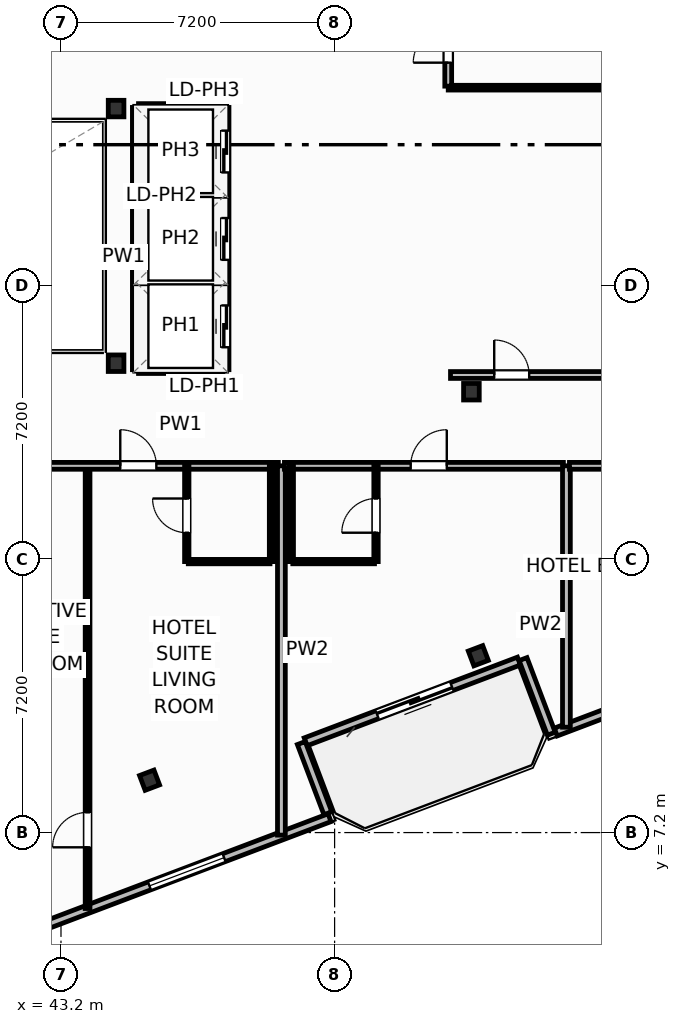
"""IFC4 building model, lengths in metres.
Left out: names, types, materials, properties, quantities, classifications, styles, units other than length and angle.
Written with IfcOpenShell. Run it as: python <this file> out.ifc"""

import sys

from ifc_helpers import new_model, si_unit, direction, frame, frame_2d, origin, origin_2d, place, context, subcontext, project, spatial, rectangle, i_section, extrude, element, fill, save


model = new_model("IFC4")
c1 = context("Model", 3, precision=1e-05, world=origin(), true_north=direction((0.0, 1.0)))
c2 = subcontext(c1, "Body", "Model", "MODEL_VIEW")
j1 = project(units=[si_unit("LENGTHUNIT", "METRE"), si_unit("PLANEANGLEUNIT", "RADIAN")], contexts=[c1])
p1 = place(None, origin())
s1 = spatial("IfcSite", under=j1, at=p1, CompositionType="ELEMENT")
p2 = place(p1, origin())
s2 = spatial("IfcBuilding", under=s1, at=p2, CompositionType="ELEMENT")
p3 = place(p2, frame((0.0, 0.0, 242.3)))
s3 = spatial("IfcBuildingStorey", under=s2, at=p3, CompositionType="ELEMENT", Elevation=242.3)
for number, where, z_axis, x_axis in (
    (1, (44.65, 19.55, 0.0), (0.0, 0.0, 1.0), (1.0, 0.0, 0.0)),
    (2, (44.65, 26.25, 0.0), (0.0, 0.0, 1.0), (1.0, 0.0, 0.0)),
    (3, (54.0, 18.8, 0.0), (0.0, 0.0, 1.0), (1.0, 0.0, 0.0)),
):
    element("IfcColumn", number, at=place(p3, frame(where, z_axis=z_axis, x_axis=x_axis)), inside=s3, PredefinedType="COLUMN", context=c2, shape_type="SweptSolid", body=[
        extrude(i_section(OverallWidth=0.412, OverallDepth=0.435, WebThickness=0.036, FlangeThickness=0.057, FilletRadius=0.025, at=origin_2d()), origin(), (0.0, 0.0, 1.0), 3.7),
    ])
for number, where, z_axis, x_axis in (
    (4, (45.531, 8.578, 0.0), (0.0, 0.0, 1.0), (0.935, 0.354, 0.0)),
    (5, (54.181, 11.853, 0.0), (0.0, 0.0, 1.0), (0.935, 0.354, 0.0)),
):
    element("IfcColumn", number, at=place(p3, frame(where, z_axis=z_axis, x_axis=x_axis)), inside=s3, PredefinedType="COLUMN", context=c2, shape_type="SweptSolid", body=[
        extrude(i_section(OverallWidth=0.406, OverallDepth=0.416, WebThickness=0.03, FlangeThickness=0.048, FilletRadius=0.025, at=origin_2d()), origin(), (0.0, 0.0, 1.0), 3.7),
    ])
p4 = place(p3, frame((55.25, 11.713, 0.0), z_axis=(0.0, 0.0, 1.0), x_axis=(-0.935227640088, -0.354046976001, 0.0)))
e6 = element("IfcWall", 6, at=p4, inside=s3, PredefinedType="SOLIDWALL", context=c2, shape_type="SweptSolid", body=[
    extrude(rectangle(XDim=6.0, YDim=0.22, at=frame_2d((3.0, 0.0))), origin(), (0.0, 0.0, 1.0), 2.73),
])
p5 = place(p4, frame((1.888, 0.0, 0.0)))
e7 = element("IfcOpeningElement", 7, at=p5, cuts=e6, PredefinedType="OPENING", context=c2, shape_type="SweptSolid", body=[
    extrude(rectangle(XDim=2.1, YDim=2.3, at=frame_2d((1.05, 1.15))), frame((0.0, 0.12, 0.0), z_axis=(0.0, -1.0, 0.0), x_axis=(1.0, 0.0, 0.0)), (0.0, 0.0, 1.0), 0.24),
])
p6 = place(p3, frame((42.752, 4.746, 0.0), z_axis=(0.0, 0.0, 1.0), x_axis=(0.935216926991, 0.354075273733, 0.0)))
e8 = element("IfcWall", 8, at=p6, inside=s3, PredefinedType="SOLIDWALL", context=c2, shape_type="SweptSolid", body=[
    extrude(rectangle(XDim=8.035, YDim=0.22, at=frame_2d((4.018, 0.0))), origin(), (0.0, 0.0, 1.0), 2.73),
])
p7 = place(p6, frame((2.968, 0.0, 0.8)))
e9 = element("IfcOpeningElement", 9, at=p7, cuts=e8, PredefinedType="OPENING", context=c2, shape_type="SweptSolid", body=[
    extrude(rectangle(XDim=2.1, YDim=1.75, at=frame_2d((1.05, 0.875))), frame((0.0, 0.12, 0.0), z_axis=(0.0, -1.0, 0.0), x_axis=(1.0, 0.0, 0.0)), (0.0, 0.0, 1.0), 0.24),
])
p8 = place(p3, frame((50.223, 7.708, 0.0), z_axis=(0.0, 0.0, 1.0), x_axis=(-0.354020680661, 0.935237594232, 0.0)))
e10 = element("IfcWall", 10, at=p8, inside=s3, PredefinedType="SOLIDWALL", context=c2, shape_type="SweptSolid", body=[
    extrude(rectangle(XDim=1.975, YDim=0.22, at=frame_2d((0.988, 0.0))), origin(), (0.0, 0.0, 1.0), 2.73),
])
p9 = place(p3, frame((55.359, 11.764, 0.0), z_axis=(0.0, 0.0, 1.0), x_axis=(0.354026782794, -0.935235284334, 0.0)))
e11 = element("IfcWall", 11, at=p9, inside=s3, PredefinedType="SOLIDWALL", context=c2, shape_type="SweptSolid", body=[
    extrude(rectangle(XDim=2.1, YDim=0.22, at=frame_2d((1.05, 0.0))), origin(), (0.0, 0.0, 1.0), 2.73),
])
p10 = place(p3, frame((56.219, 9.845, 0.0), z_axis=(0.0, 0.0, 1.0), x_axis=(0.935225601791, 0.354052360188, 0.0)))
e12 = element("IfcWall", 12, at=p10, inside=s3, PredefinedType="SOLIDWALL", context=c2, shape_type="SweptSolid", body=[
    extrude(rectangle(XDim=17.647, YDim=0.22, at=frame_2d((8.824, 0.0))), origin(), (0.0, 0.0, 1.0), 2.73),
])
p11 = place(p10, frame((7.774, 0.0, 0.8)))
e13 = element("IfcOpeningElement", 13, at=p11, cuts=e12, PredefinedType="OPENING", context=c2, shape_type="SweptSolid", body=[
    extrude(rectangle(XDim=2.1, YDim=1.75, at=frame_2d((1.05, 0.875))), frame((0.0, 0.12, 0.0), z_axis=(0.0, -1.0, 0.0), x_axis=(1.0, 0.0, 0.0)), (0.0, 0.0, 1.0), 0.24),
])
p12 = place(p3, frame((43.9, 5.202, 0.0), z_axis=(0.0, 0.0, 1.0), x_axis=(0.0, 1.0, 0.0)))
e14 = element("IfcWall", 14, at=p12, inside=s3, PredefinedType="PARTITIONING", context=c2, shape_type="SweptSolid", body=[
    extrude(rectangle(XDim=11.648, YDim=0.125, at=frame_2d((5.824, 0.0))), origin(), (0.0, 0.0, 1.0), 3.45),
])
p13 = place(p12, frame((1.61, 0.0, 0.0)))
e15 = element("IfcOpeningElement", 15, at=p13, cuts=e14, PredefinedType="OPENING", context=c2, shape_type="SweptSolid", body=[
    extrude(rectangle(XDim=0.92, YDim=2.05, at=frame_2d((0.46, 1.025))), frame((0.0, 0.073, 0.0), z_axis=(0.0, -1.0, 0.0), x_axis=(1.0, 0.0, 0.0)), (0.0, 0.0, 1.0), 0.145),
])
p14 = place(p3, frame((41.08, 16.85, 0.0), z_axis=(0.0, 0.0, 1.0), x_axis=(1.0, 0.0, 0.0)))
e16 = element("IfcWall", 16, at=p14, inside=s3, PredefinedType="PARTITIONING", context=c2, shape_type="SweptSolid", body=[
    extrude(rectangle(XDim=7.84, YDim=0.18, at=frame_2d((3.92, 0.0))), origin(), (0.0, 0.0, 1.0), 3.45),
])
p15 = place(p14, frame((3.68, 0.0, 0.0)))
e17 = element("IfcOpeningElement", 17, at=p15, cuts=e16, PredefinedType="OPENING", context=c2, shape_type="SweptSolid", body=[
    extrude(rectangle(XDim=0.95, YDim=2.15, at=frame_2d((0.475, 1.075))), frame((0.0, 0.1, 0.0), z_axis=(0.0, -1.0, 0.0), x_axis=(1.0, 0.0, 0.0)), (0.0, 0.0, 1.0), 0.2),
])
p16 = place(p3, frame((46.55, 14.33, 0.0), z_axis=(0.0, 0.0, 1.0), x_axis=(1.0, 0.0, 0.0)))
e18 = element("IfcWall", 18, at=p16, inside=s3, PredefinedType="PARTITIONING", context=c2, shape_type="SweptSolid", body=[
    extrude(rectangle(XDim=2.15, YDim=0.115, at=frame_2d((1.075, 0.0))), origin(), (0.0, 0.0, 1.0), 3.45),
])
p17 = place(p3, frame((46.51, 14.33, 0.0), z_axis=(0.0, 0.0, 1.0), x_axis=(0.0, 1.0, 0.0)))
e19 = element("IfcWall", 19, at=p17, inside=s3, PredefinedType="PARTITIONING", context=c2, shape_type="SweptSolid", body=[
    extrude(rectangle(XDim=2.52, YDim=0.115, at=frame_2d((1.26, 0.0))), origin(), (0.0, 0.0, 1.0), 3.45),
])
p18 = place(p17, frame((0.76, 0.0, 0.0)))
e20 = element("IfcOpeningElement", 20, at=p18, cuts=e19, PredefinedType="OPENING", context=c2, shape_type="SweptSolid", body=[
    extrude(rectangle(XDim=0.9, YDim=2.05, at=frame_2d((0.45, 1.025))), frame((0.0, 0.067, 0.0), z_axis=(0.0, -1.0, 0.0), x_axis=(1.0, 0.0, 0.0)), (0.0, 0.0, 1.0), 0.135),
])
p19 = place(p3, frame((48.74, 14.33, 0.0), z_axis=(0.0, 0.0, 1.0), x_axis=(0.0, 1.0, 0.0)))
e21 = element("IfcWall", 21, at=p19, inside=s3, PredefinedType="PARTITIONING", context=c2, shape_type="SweptSolid", body=[
    extrude(rectangle(XDim=2.52, YDim=0.115, at=frame_2d((1.26, 0.0))), origin(), (0.0, 0.0, 1.0), 3.45),
])
p20 = place(p3, frame((49.0, 7.133, 0.0), z_axis=(0.0, 0.0, 1.0), x_axis=(0.0, 1.0, 0.0)))
e22 = element("IfcWall", 22, at=p20, inside=s3, PredefinedType="PARTITIONING", context=c2, shape_type="SweptSolid", body=[
    extrude(rectangle(XDim=9.717, YDim=0.205, at=frame_2d((4.858, 0.0))), origin(), (0.0, 0.0, 1.0), 3.45),
])
p21 = place(p3, frame((49.08, 16.85, 0.0), z_axis=(0.0, 0.0, 1.0), x_axis=(1.0, 0.0, 0.0)))
e23 = element("IfcWall", 23, at=p21, inside=s3, PredefinedType="PARTITIONING", context=c2, shape_type="SweptSolid", body=[
    extrude(rectangle(XDim=7.34, YDim=0.18, at=frame_2d((3.67, 0.0))), origin(), (0.0, 0.0, 1.0), 3.45),
])
p22 = place(p21, frame((3.322, 0.0, 0.0)))
e24 = element("IfcOpeningElement", 24, at=p22, cuts=e23, PredefinedType="OPENING", context=c2, shape_type="SweptSolid", body=[
    extrude(rectangle(XDim=0.95, YDim=2.15, at=frame_2d((0.475, 1.075))), frame((0.0, 0.1, 0.0), z_axis=(0.0, -1.0, 0.0), x_axis=(1.0, 0.0, 0.0)), (0.0, 0.0, 1.0), 0.2),
])
p23 = place(p3, frame((49.3, 14.33, 0.0), z_axis=(0.0, 0.0, 1.0), x_axis=(1.0, 0.0, 0.0)))
e25 = element("IfcWall", 25, at=p23, inside=s3, PredefinedType="PARTITIONING", context=c2, shape_type="SweptSolid", body=[
    extrude(rectangle(XDim=2.15, YDim=0.115, at=frame_2d((1.075, 0.0))), origin(), (0.0, 0.0, 1.0), 3.45),
])
p24 = place(p3, frame((51.49, 14.33, 0.0), z_axis=(0.0, 0.0, 1.0), x_axis=(0.0, 1.0, 0.0)))
e26 = element("IfcWall", 26, at=p24, inside=s3, PredefinedType="PARTITIONING", context=c2, shape_type="SweptSolid", body=[
    extrude(rectangle(XDim=2.52, YDim=0.115, at=frame_2d((1.26, 0.0))), origin(), (0.0, 0.0, 1.0), 3.45),
])
p25 = place(p24, frame((0.76, 0.0, 0.0)))
e27 = element("IfcOpeningElement", 27, at=p25, cuts=e26, PredefinedType="OPENING", context=c2, shape_type="SweptSolid", body=[
    extrude(rectangle(XDim=0.9, YDim=2.05, at=frame_2d((0.45, 1.025))), frame((0.0, 0.067, 0.0), z_axis=(0.0, -1.0, 0.0), x_axis=(1.0, 0.0, 0.0)), (0.0, 0.0, 1.0), 0.135),
])
p26 = place(p3, frame((49.26, 14.33, 0.0), z_axis=(0.0, 0.0, 1.0), x_axis=(0.0, 1.0, 0.0)))
e28 = element("IfcWall", 28, at=p26, inside=s3, PredefinedType="PARTITIONING", context=c2, shape_type="SweptSolid", body=[
    extrude(rectangle(XDim=2.52, YDim=0.115, at=frame_2d((1.26, 0.0))), origin(), (0.0, 0.0, 1.0), 3.45),
])
p27 = place(p3, frame((56.5, 9.972, 0.0), z_axis=(0.0, 0.0, 1.0), x_axis=(0.0, 1.0, 0.0)))
e29 = element("IfcWall", 29, at=p27, inside=s3, PredefinedType="PARTITIONING", context=c2, shape_type="SweptSolid", body=[
    extrude(rectangle(XDim=6.878, YDim=0.205, at=frame_2d((3.439, 0.0))), origin(), (0.0, 0.0, 1.0), 3.45),
])
p28 = place(p3, frame((56.58, 16.85, 0.0), z_axis=(0.0, 0.0, 1.0), x_axis=(1.0, 0.0, 0.0)))
e30 = element("IfcWall", 30, at=p28, inside=s3, PredefinedType="PARTITIONING", context=c2, shape_type="SweptSolid", body=[
    extrude(rectangle(XDim=17.404, YDim=0.18, at=frame_2d((8.702, 0.0))), origin(), (0.0, 0.0, 1.0), 3.45),
])
p29 = place(p28, frame((0.995, 0.0, 0.0)))
e31 = element("IfcOpeningElement", 31, at=p29, cuts=e30, PredefinedType="OPENING", context=c2, shape_type="SweptSolid", body=[
    extrude(rectangle(XDim=0.95, YDim=2.05, at=frame_2d((0.475, 1.025))), frame((0.0, 0.1, 0.0), z_axis=(0.0, -1.0, 0.0), x_axis=(1.0, 0.0, 0.0)), (0.0, 0.0, 1.0), 0.2),
])
p30 = place(p3, frame((53.45, 19.24, 0.0), z_axis=(0.0, 0.0, 1.0), x_axis=(1.0, 0.0, 0.0)))
e32 = element("IfcWall", 32, at=p30, inside=s3, PredefinedType="PARTITIONING", context=c2, shape_type="SweptSolid", body=[
    extrude(rectangle(XDim=22.156, YDim=0.18, at=frame_2d((11.078, 0.0))), origin(), (0.0, 0.0, 1.0), 3.45),
])
p31 = place(p30, frame((1.15, 0.0, 0.0)))
e33 = element("IfcOpeningElement", 33, at=p31, cuts=e32, PredefinedType="OPENING", context=c2, shape_type="SweptSolid", body=[
    extrude(rectangle(XDim=0.92, YDim=2.05, at=frame_2d((0.46, 1.025))), frame((0.0, 0.1, 0.0), z_axis=(0.0, -1.0, 0.0), x_axis=(1.0, 0.0, 0.0)), (0.0, 0.0, 1.0), 0.2),
])
p32 = place(p3, frame((53.39, 26.8, 0.0), z_axis=(0.0, 0.0, 1.0), x_axis=(1.0, 0.0, 0.0)))
e34 = element("IfcWall", 34, at=p32, inside=s3, PredefinedType="PARTITIONING", context=c2, shape_type="SweptSolid", body=[
    extrude(rectangle(XDim=20.445, YDim=0.125, at=frame_2d((10.223, 0.0))), origin(), (0.0, 0.0, 1.0), 2.739),
])
p33 = place(p3, frame((53.39, 26.84, 0.0), z_axis=(0.0, 0.0, 1.0), x_axis=(0.0, 1.0, 0.0)))
e35 = element("IfcWall", 35, at=p33, inside=s3, PredefinedType="PARTITIONING", context=c2, shape_type="SweptSolid", body=[
    extrude(rectangle(XDim=12.46, YDim=0.18, at=frame_2d((6.23, 0.0))), origin(), (0.0, 0.0, 1.0), 3.45),
])
p34 = place(p33, frame((0.618, 0.0, 0.0)))
e36 = element("IfcOpeningElement", 36, at=p34, cuts=e35, PredefinedType="OPENING", context=c2, shape_type="SweptSolid", body=[
    extrude(rectangle(XDim=0.92, YDim=2.05, at=frame_2d((0.46, 1.025))), frame((0.0, 0.1, 0.0), z_axis=(0.0, -1.0, 0.0), x_axis=(1.0, 0.0, 0.0)), (0.0, 0.0, 1.0), 0.2),
])
for number, where, z_axis, x_axis in (
    (37, (45.24, 21.675, 0.0), (0.0, 0.0, 1.0), (1.0, 0.0, 0.0)),
    (38, (45.24, 23.975, 0.0), (0.0, 0.0, 1.0), (1.0, 0.0, 0.0)),
):
    element("IfcWall", number, at=place(p3, frame(where, z_axis=z_axis, x_axis=x_axis)), inside=s3, PredefinedType="PARTITIONING", context=c2, shape_type="SweptSolid", body=[
        extrude(rectangle(XDim=2.22, YDim=0.2, at=frame_2d((1.11, 0.0))), origin(), (0.0, 0.0, 1.0), 3.45),
    ])
p35 = place(p3, frame((45.24, 19.38, 0.0), z_axis=(0.0, 0.0, 1.0), x_axis=(1.0, 0.0, 0.0)))
e39 = element("IfcWall", 39, at=p35, inside=s3, PredefinedType="PARTITIONING", context=c2, shape_type="SweptSolid", body=[
    extrude(rectangle(XDim=2.22, YDim=0.2, at=frame_2d((1.11, 0.0))), origin(), (0.0, 0.0, 1.0), 2.662),
])
p36 = place(p3, frame((45.24, 26.28, 0.0), z_axis=(0.0, 0.0, 1.0), x_axis=(1.0, 0.0, 0.0)))
e40 = element("IfcWall", 40, at=p36, inside=s3, PredefinedType="PARTITIONING", context=c2, shape_type="SweptSolid", body=[
    extrude(rectangle(XDim=2.22, YDim=0.2, at=frame_2d((1.11, 0.0))), origin(), (0.0, 0.0, 1.0), 3.45),
])
p37 = place(p3, frame((45.18, 19.38, 0.0), z_axis=(0.0, 0.0, 1.0), x_axis=(0.0, 1.0, 0.0)))
e41 = element("IfcWall", 41, at=p37, inside=s3, PredefinedType="PARTITIONING", context=c2, shape_type="SweptSolid", body=[
    extrude(rectangle(XDim=6.9, YDim=0.2, at=frame_2d((3.45, 0.0))), origin(), (0.0, 0.0, 1.0), 3.45),
])
p38 = place(p3, frame((47.52, 19.38, 0.0), z_axis=(0.0, 0.0, 1.0), x_axis=(0.0, 1.0, 0.0)))
e42 = element("IfcWall", 42, at=p38, inside=s3, PredefinedType="PARTITIONING", context=c2, shape_type="SweptSolid", body=[
    extrude(rectangle(XDim=6.9, YDim=0.2, at=frame_2d((3.45, 0.0))), origin(), (0.0, 0.0, 1.0), 3.45),
])
p39 = place(p38, frame((0.59, 0.0, 0.0)))
e43 = element("IfcOpeningElement", 43, at=p39, cuts=e42, PredefinedType="OPENING", context=c2, shape_type="SweptSolid", body=[
    extrude(rectangle(XDim=1.1, YDim=2.15, at=frame_2d((0.55, 1.075))), frame((0.0, 0.11, 0.0), z_axis=(0.0, -1.0, 0.0), x_axis=(1.0, 0.0, 0.0)), (0.0, 0.0, 1.0), 0.22),
])
p40 = place(p38, frame((2.89, 0.0, 0.0)))
e44 = element("IfcOpeningElement", 44, at=p40, cuts=e42, PredefinedType="OPENING", context=c2, shape_type="SweptSolid", body=[
    extrude(rectangle(XDim=1.1, YDim=2.15, at=frame_2d((0.55, 1.075))), frame((0.0, 0.11, 0.0), z_axis=(0.0, -1.0, 0.0), x_axis=(1.0, 0.0, 0.0)), (0.0, 0.0, 1.0), 0.22),
])
p41 = place(p38, frame((5.19, 0.0, 0.0)))
e45 = element("IfcOpeningElement", 45, at=p41, cuts=e42, PredefinedType="OPENING", context=c2, shape_type="SweptSolid", body=[
    extrude(rectangle(XDim=1.1, YDim=2.15, at=frame_2d((0.55, 1.075))), frame((0.0, 0.11, 0.0), z_axis=(0.0, -1.0, 0.0), x_axis=(1.0, 0.0, 0.0)), (0.0, 0.0, 1.0), 0.22),
])
p42 = place(p5, origin())
e46 = element("IfcDoor", 46, at=p42, inside=s3, OperationType="SLIDING_TO_LEFT", PredefinedType="DOOR", context=c2, shape_type="SweptSolid", body=[
    extrude(rectangle(XDim=2.1, YDim=2.3, at=frame_2d((1.05, 1.15))), frame((0.0, 0.025, 0.0), z_axis=(0.0, -1.0, 0.0), x_axis=(1.0, 0.0, 0.0)), (0.0, 0.0, 1.0), 0.05),
])
fill(e7, e46)
p43 = place(p7, origin())
e47 = element("IfcWindow", 47, at=p43, inside=s3, PartitioningType="SINGLE_PANEL", PredefinedType="WINDOW", context=c2, shape_type="SweptSolid", body=[
    extrude(rectangle(XDim=2.1, YDim=1.75, at=frame_2d((1.05, 0.875))), frame((0.0, 0.03, 0.0), z_axis=(0.0, -1.0, 0.0), x_axis=(1.0, 0.0, 0.0)), (0.0, 0.0, 1.0), 0.06),
])
fill(e9, e47)
p44 = place(p13, origin())
e48 = element("IfcDoor", 48, at=p44, inside=s3, OperationType="SINGLE_SWING_LEFT", PredefinedType="DOOR", context=c2, shape_type="SweptSolid", body=[
    extrude(rectangle(XDim=0.92, YDim=2.05, at=frame_2d((0.46, 1.025))), frame((0.0, 0.025, 0.0), z_axis=(0.0, -1.0, 0.0), x_axis=(1.0, 0.0, 0.0)), (0.0, 0.0, 1.0), 0.05),
])
fill(e15, e48)
p45 = place(p15, origin())
e49 = element("IfcDoor", 49, at=p45, inside=s3, OperationType="SINGLE_SWING_LEFT", PredefinedType="DOOR", context=c2, shape_type="SweptSolid", body=[
    extrude(rectangle(XDim=0.95, YDim=2.15, at=frame_2d((0.475, 1.075))), frame((0.0, 0.025, 0.0), z_axis=(0.0, -1.0, 0.0), x_axis=(1.0, 0.0, 0.0)), (0.0, 0.0, 1.0), 0.05),
])
fill(e17, e49)
p46 = place(p18, origin())
e50 = element("IfcDoor", 50, at=p46, inside=s3, OperationType="SINGLE_SWING_RIGHT", PredefinedType="DOOR", context=c2, shape_type="SweptSolid", body=[
    extrude(rectangle(XDim=0.9, YDim=2.05, at=frame_2d((0.45, 1.025))), frame((0.0, 0.025, 0.0), z_axis=(0.0, -1.0, 0.0), x_axis=(1.0, 0.0, 0.0)), (0.0, 0.0, 1.0), 0.05),
])
fill(e20, e50)
p47 = place(p22, origin())
e51 = element("IfcDoor", 51, at=p47, inside=s3, OperationType="SINGLE_SWING_RIGHT", PredefinedType="DOOR", context=c2, shape_type="SweptSolid", body=[
    extrude(rectangle(XDim=0.95, YDim=2.15, at=frame_2d((0.475, 1.075))), frame((0.0, 0.025, 0.0), z_axis=(0.0, -1.0, 0.0), x_axis=(1.0, 0.0, 0.0)), (0.0, 0.0, 1.0), 0.05),
])
fill(e24, e51)
p48 = place(p25, origin())
e52 = element("IfcDoor", 52, at=p48, inside=s3, OperationType="SINGLE_SWING_LEFT", PredefinedType="DOOR", context=c2, shape_type="SweptSolid", body=[
    extrude(rectangle(XDim=0.9, YDim=2.05, at=frame_2d((0.45, 1.025))), frame((0.0, 0.025, 0.0), z_axis=(0.0, -1.0, 0.0), x_axis=(1.0, 0.0, 0.0)), (0.0, 0.0, 1.0), 0.05),
])
fill(e27, e52)
p49 = place(p31, origin())
e53 = element("IfcDoor", 53, at=p49, inside=s3, OperationType="SINGLE_SWING_LEFT", PredefinedType="DOOR", context=c2, shape_type="SweptSolid", body=[
    extrude(rectangle(XDim=0.92, YDim=2.05, at=frame_2d((0.46, 1.025))), frame((0.0, 0.025, 0.0), z_axis=(0.0, -1.0, 0.0), x_axis=(1.0, 0.0, 0.0)), (0.0, 0.0, 1.0), 0.05),
])
fill(e33, e53)
p50 = place(p34, origin())
e54 = element("IfcDoor", 54, at=p50, inside=s3, OperationType="SINGLE_SWING_LEFT", PredefinedType="DOOR", context=c2, shape_type="SweptSolid", body=[
    extrude(rectangle(XDim=0.92, YDim=2.05, at=frame_2d((0.46, 1.025))), frame((0.0, 0.025, 0.0), z_axis=(0.0, -1.0, 0.0), x_axis=(1.0, 0.0, 0.0)), (0.0, 0.0, 1.0), 0.05),
])
fill(e36, e54)
p51 = place(p39, origin())
e55 = element("IfcDoor", 55, at=p51, inside=s3, OperationType="SLIDING_TO_LEFT", PredefinedType="DOOR", context=c2, shape_type="SweptSolid", body=[
    extrude(rectangle(XDim=1.1, YDim=2.15, at=frame_2d((0.55, 1.075))), frame((0.0, 0.025, 0.0), z_axis=(0.0, -1.0, 0.0), x_axis=(1.0, 0.0, 0.0)), (0.0, 0.0, 1.0), 0.05),
])
fill(e43, e55)
p52 = place(p40, origin())
e56 = element("IfcDoor", 56, at=p52, inside=s3, OperationType="SLIDING_TO_LEFT", PredefinedType="DOOR", context=c2, shape_type="SweptSolid", body=[
    extrude(rectangle(XDim=1.1, YDim=2.15, at=frame_2d((0.55, 1.075))), frame((0.0, 0.025, 0.0), z_axis=(0.0, -1.0, 0.0), x_axis=(1.0, 0.0, 0.0)), (0.0, 0.0, 1.0), 0.05),
])
fill(e44, e56)
p53 = place(p41, origin())
e57 = element("IfcDoor", 57, at=p53, inside=s3, OperationType="SLIDING_TO_LEFT", PredefinedType="DOOR", context=c2, shape_type="SweptSolid", body=[
    extrude(rectangle(XDim=1.1, YDim=2.15, at=frame_2d((0.55, 1.075))), frame((0.0, 0.025, 0.0), z_axis=(0.0, -1.0, 0.0), x_axis=(1.0, 0.0, 0.0)), (0.0, 0.0, 1.0), 0.05),
])
fill(e45, e57)
save(model, sys.argv[1])
